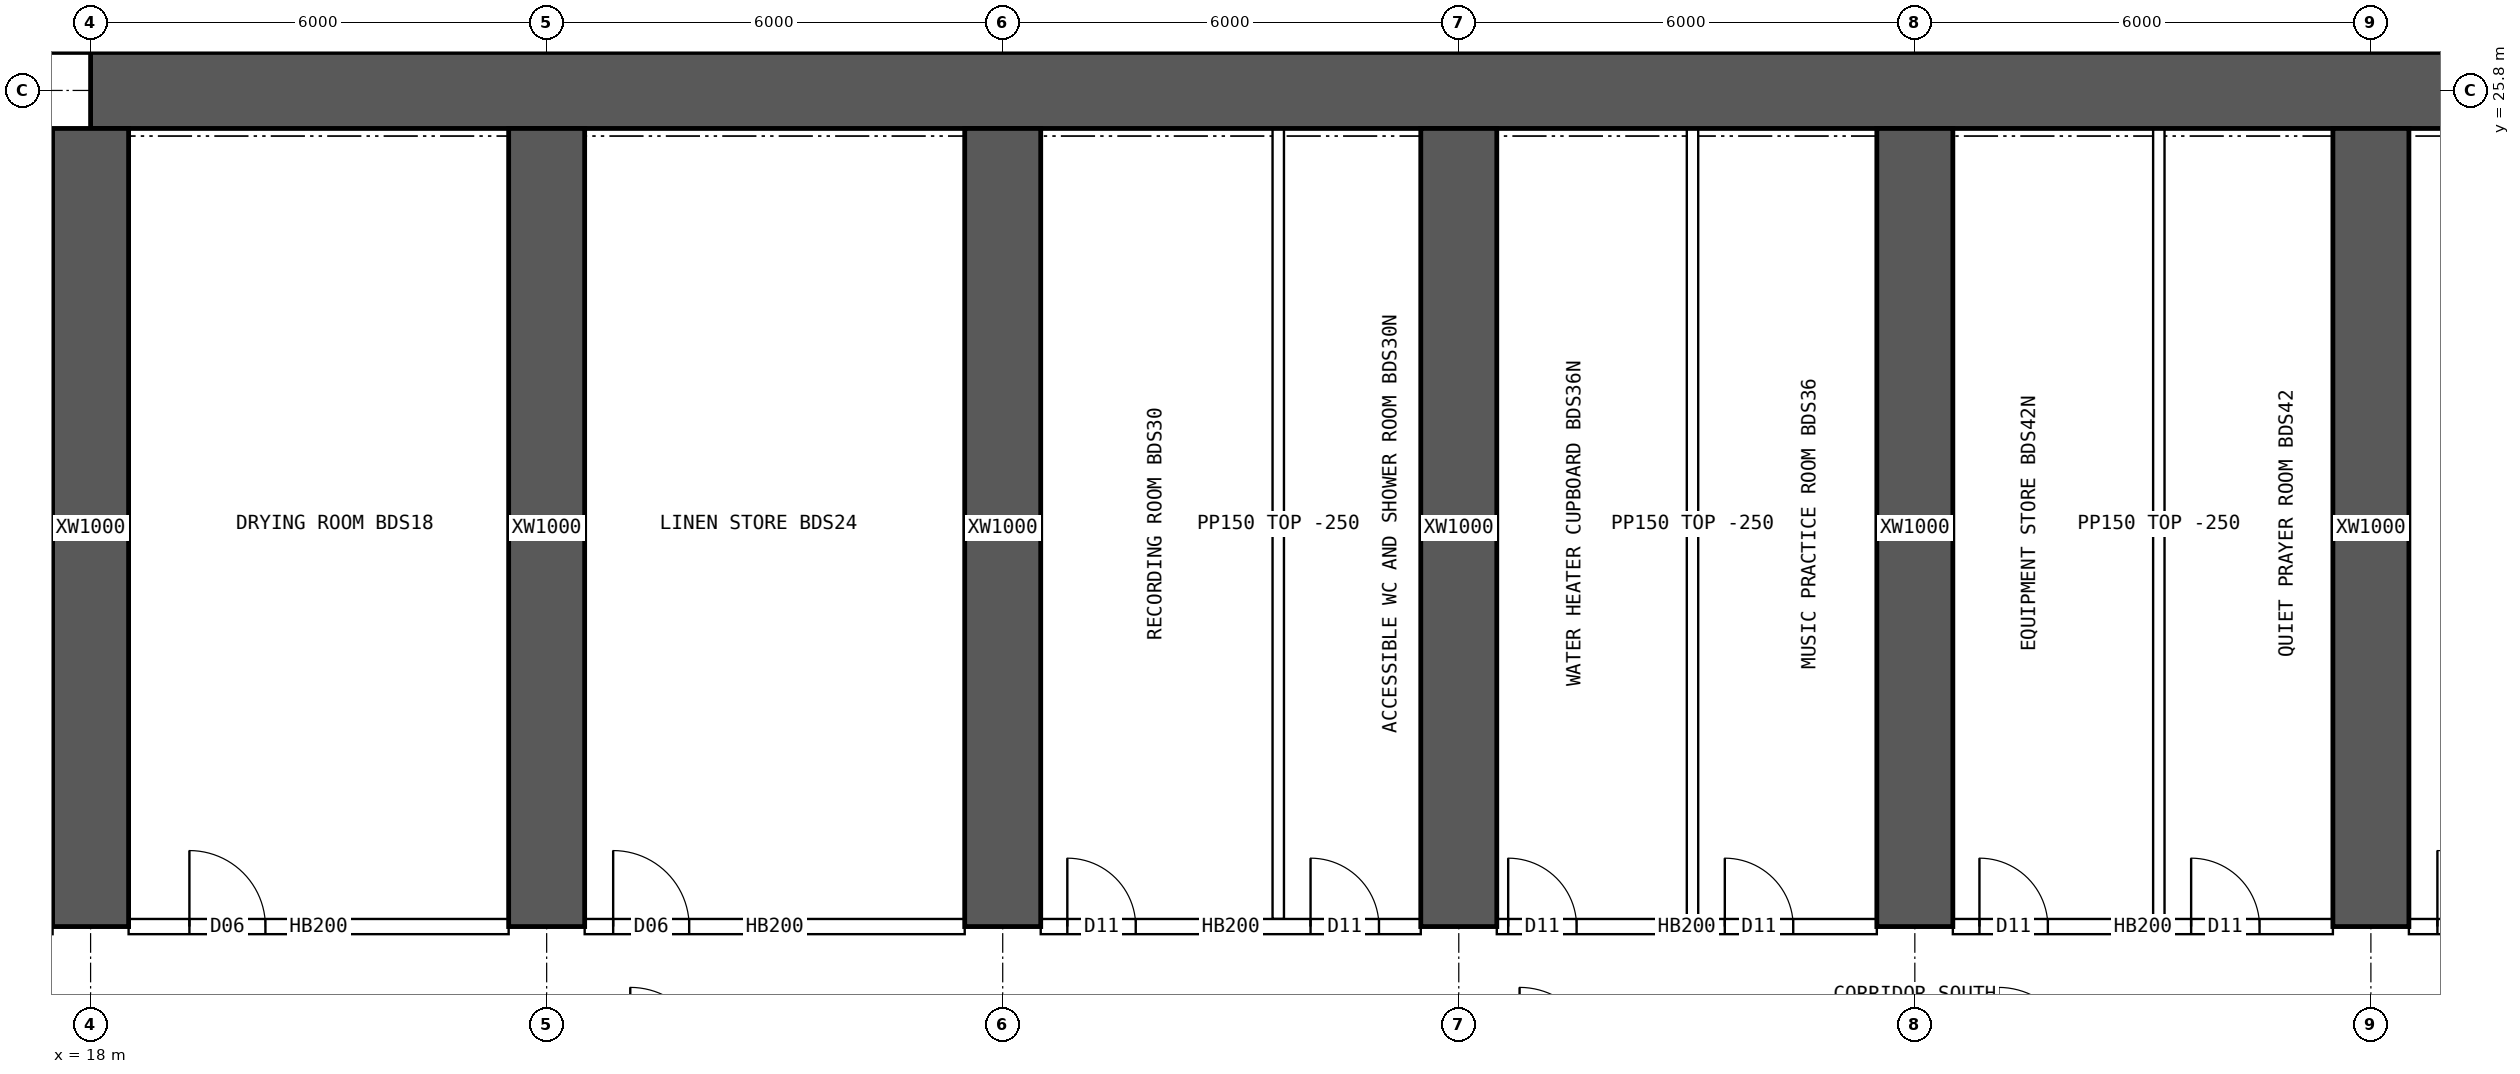
"""IFC4 building model, lengths in metres.
Left out: names, types, materials, properties, quantities, classifications, styles, units other than length and angle.
Written with IfcOpenShell. Run it as: python <this file> out.ifc"""

import sys

from ifc_helpers import new_model, si_unit, direction, frame, frame_2d, origin, place, context, subcontext, project, spatial, rectangle, extrude, element, fill, save


model = new_model("IFC4")
c1 = context("Model", 3, precision=1e-05, world=origin(), true_north=direction((0.0, 1.0)))
c2 = subcontext(c1, "Body", "Model", "MODEL_VIEW")
j1 = project(units=[si_unit("LENGTHUNIT", "METRE"), si_unit("PLANEANGLEUNIT", "RADIAN")], contexts=[c1])
p1 = place(None, origin())
s1 = spatial("IfcSite", under=j1, at=p1, CompositionType="ELEMENT")
p2 = place(p1, origin())
s2 = spatial("IfcBuilding", under=s1, at=p2, CompositionType="ELEMENT")
p3 = place(p2, frame((0.0, 0.0, 53.95)))
s3 = spatial("IfcBuildingStorey", under=s2, at=p3, CompositionType="ELEMENT", Elevation=53.95)
p4 = place(p3, frame((18.0, 25.8, 0.0), z_axis=(0.0, 0.0, 1.0), x_axis=(1.0, 0.0, 0.0)))
e1 = element("IfcWall", 1, at=p4, inside=s3, PredefinedType="SHEAR", context=c2, shape_type="SweptSolid", body=[
    extrude(rectangle(XDim=48.0, YDim=1.0, at=frame_2d((24.0, 0.0))), origin(), (0.0, 0.0, 1.0), 3.75),
])
for number, where, z_axis, x_axis in (
    (2, (18.0, 14.8, 0.0), (0.0, 0.0, 1.0), (0.0, 1.0, 0.0)),
    (3, (24.0, 14.8, 0.0), (0.0, 0.0, 1.0), (0.0, 1.0, 0.0)),
    (4, (30.0, 14.8, 0.0), (0.0, 0.0, 1.0), (0.0, 1.0, 0.0)),
    (5, (36.0, 14.8, 0.0), (0.0, 0.0, 1.0), (0.0, 1.0, 0.0)),
    (6, (42.0, 14.8, 0.0), (0.0, 0.0, 1.0), (0.0, 1.0, 0.0)),
    (7, (48.0, 14.8, 0.0), (0.0, 0.0, 1.0), (0.0, 1.0, 0.0)),
):
    element("IfcWall", number, at=place(p3, frame(where, z_axis=z_axis, x_axis=x_axis)), inside=s3, PredefinedType="SHEAR", context=c2, shape_type="SweptSolid", body=[
        extrude(rectangle(XDim=10.5, YDim=1.0, at=frame_2d((5.25, 0.0))), origin(), (0.0, 0.0, 1.0), 3.75),
    ])
p5 = place(p3, frame((18.5, 14.8, 0.0), z_axis=(0.0, 0.0, 1.0), x_axis=(1.0, 0.0, 0.0)))
e8 = element("IfcWall", 8, at=p5, inside=s3, PredefinedType="SOLIDWALL", context=c2, shape_type="SweptSolid", body=[
    extrude(rectangle(XDim=5.0, YDim=0.2, at=frame_2d((2.5, 0.0))), origin(), (0.0, 0.0, 1.0), 3.5),
])
p6 = place(p5, frame((0.8, 0.0, 0.0)))
e9 = element("IfcOpeningElement", 9, at=p6, cuts=e8, PredefinedType="OPENING", context=c2, shape_type="SweptSolid", body=[
    extrude(rectangle(XDim=1.0, YDim=2.1, at=frame_2d((0.5, 1.05))), frame((0.0, 0.11, 0.0), z_axis=(0.0, -1.0, 0.0), x_axis=(1.0, 0.0, 0.0)), (0.0, 0.0, 1.0), 0.22),
])
p7 = place(p3, frame((24.5, 14.8, 0.0), z_axis=(0.0, 0.0, 1.0), x_axis=(1.0, 0.0, 0.0)))
e10 = element("IfcWall", 10, at=p7, inside=s3, PredefinedType="SOLIDWALL", context=c2, shape_type="SweptSolid", body=[
    extrude(rectangle(XDim=5.0, YDim=0.2, at=frame_2d((2.5, 0.0))), origin(), (0.0, 0.0, 1.0), 3.5),
])
p8 = place(p7, frame((0.375, 0.0, 0.0)))
e11 = element("IfcOpeningElement", 11, at=p8, cuts=e10, PredefinedType="OPENING", context=c2, shape_type="SweptSolid", body=[
    extrude(rectangle(XDim=1.0, YDim=2.1, at=frame_2d((0.5, 1.05))), frame((0.0, 0.11, 0.0), z_axis=(0.0, -1.0, 0.0), x_axis=(1.0, 0.0, 0.0)), (0.0, 0.0, 1.0), 0.22),
])
p9 = place(p3, frame((30.5, 14.8, 0.0), z_axis=(0.0, 0.0, 1.0), x_axis=(1.0, 0.0, 0.0)))
e12 = element("IfcWall", 12, at=p9, inside=s3, PredefinedType="SOLIDWALL", context=c2, shape_type="SweptSolid", body=[
    extrude(rectangle(XDim=5.0, YDim=0.2, at=frame_2d((2.5, 0.0))), origin(), (0.0, 0.0, 1.0), 3.5),
])
p10 = place(p9, frame((0.35, 0.0, 0.0)))
e13 = element("IfcOpeningElement", 13, at=p10, cuts=e12, PredefinedType="OPENING", context=c2, shape_type="SweptSolid", body=[
    extrude(rectangle(XDim=0.9, YDim=2.1, at=frame_2d((0.45, 1.05))), frame((0.0, 0.11, 0.0), z_axis=(0.0, -1.0, 0.0), x_axis=(1.0, 0.0, 0.0)), (0.0, 0.0, 1.0), 0.22),
])
p11 = place(p9, frame((3.55, 0.0, 0.0)))
e14 = element("IfcOpeningElement", 14, at=p11, cuts=e12, PredefinedType="OPENING", context=c2, shape_type="SweptSolid", body=[
    extrude(rectangle(XDim=0.9, YDim=2.1, at=frame_2d((0.45, 1.05))), frame((0.0, 0.11, 0.0), z_axis=(0.0, -1.0, 0.0), x_axis=(1.0, 0.0, 0.0)), (0.0, 0.0, 1.0), 0.22),
])
p12 = place(p3, frame((36.5, 14.8, 0.0), z_axis=(0.0, 0.0, 1.0), x_axis=(1.0, 0.0, 0.0)))
e15 = element("IfcWall", 15, at=p12, inside=s3, PredefinedType="SOLIDWALL", context=c2, shape_type="SweptSolid", body=[
    extrude(rectangle(XDim=5.0, YDim=0.2, at=frame_2d((2.5, 0.0))), origin(), (0.0, 0.0, 1.0), 3.5),
])
p13 = place(p12, frame((0.15, 0.0, 0.0)))
e16 = element("IfcOpeningElement", 16, at=p13, cuts=e15, PredefinedType="OPENING", context=c2, shape_type="SweptSolid", body=[
    extrude(rectangle(XDim=0.9, YDim=2.1, at=frame_2d((0.45, 1.05))), frame((0.0, 0.11, 0.0), z_axis=(0.0, -1.0, 0.0), x_axis=(1.0, 0.0, 0.0)), (0.0, 0.0, 1.0), 0.22),
])
p14 = place(p12, frame((3.0, 0.0, 0.0)))
e17 = element("IfcOpeningElement", 17, at=p14, cuts=e15, PredefinedType="OPENING", context=c2, shape_type="SweptSolid", body=[
    extrude(rectangle(XDim=0.9, YDim=2.1, at=frame_2d((0.45, 1.05))), frame((0.0, 0.11, 0.0), z_axis=(0.0, -1.0, 0.0), x_axis=(1.0, 0.0, 0.0)), (0.0, 0.0, 1.0), 0.22),
])
p15 = place(p3, frame((42.5, 14.8, 0.0), z_axis=(0.0, 0.0, 1.0), x_axis=(1.0, 0.0, 0.0)))
e18 = element("IfcWall", 18, at=p15, inside=s3, PredefinedType="SOLIDWALL", context=c2, shape_type="SweptSolid", body=[
    extrude(rectangle(XDim=5.0, YDim=0.2, at=frame_2d((2.5, 0.0))), origin(), (0.0, 0.0, 1.0), 3.5),
])
p16 = place(p15, frame((0.35, 0.0, 0.0)))
e19 = element("IfcOpeningElement", 19, at=p16, cuts=e18, PredefinedType="OPENING", context=c2, shape_type="SweptSolid", body=[
    extrude(rectangle(XDim=0.9, YDim=2.1, at=frame_2d((0.45, 1.05))), frame((0.0, 0.11, 0.0), z_axis=(0.0, -1.0, 0.0), x_axis=(1.0, 0.0, 0.0)), (0.0, 0.0, 1.0), 0.22),
])
p17 = place(p15, frame((3.135, 0.0, 0.0)))
e20 = element("IfcOpeningElement", 20, at=p17, cuts=e18, PredefinedType="OPENING", context=c2, shape_type="SweptSolid", body=[
    extrude(rectangle(XDim=0.9, YDim=2.1, at=frame_2d((0.45, 1.05))), frame((0.0, 0.11, 0.0), z_axis=(0.0, -1.0, 0.0), x_axis=(1.0, 0.0, 0.0)), (0.0, 0.0, 1.0), 0.22),
])
p18 = place(p3, frame((48.5, 14.8, 0.0), z_axis=(0.0, 0.0, 1.0), x_axis=(1.0, 0.0, 0.0)))
e21 = element("IfcWall", 21, at=p18, inside=s3, PredefinedType="SOLIDWALL", context=c2, shape_type="SweptSolid", body=[
    extrude(rectangle(XDim=5.0, YDim=0.2, at=frame_2d((2.5, 0.0))), origin(), (0.0, 0.0, 1.0), 3.5),
])
p19 = place(p18, frame((0.375, 0.0, 0.0)))
e22 = element("IfcOpeningElement", 22, at=p19, cuts=e21, PredefinedType="OPENING", context=c2, shape_type="SweptSolid", body=[
    extrude(rectangle(XDim=1.0, YDim=2.1, at=frame_2d((0.5, 1.05))), frame((0.0, 0.11, 0.0), z_axis=(0.0, -1.0, 0.0), x_axis=(1.0, 0.0, 0.0)), (0.0, 0.0, 1.0), 0.22),
])
for number, where, z_axis, x_axis in (
    (23, (33.625, 14.9, 0.0), (0.0, 0.0, 1.0), (0.0, 1.0, 0.0)),
    (24, (39.075, 14.9, 0.0), (0.0, 0.0, 1.0), (0.0, 1.0, 0.0)),
    (25, (45.21, 14.9, 0.0), (0.0, 0.0, 1.0), (0.0, 1.0, 0.0)),
):
    element("IfcWall", number, at=place(p3, frame(where, z_axis=z_axis, x_axis=x_axis)), inside=s3, PredefinedType="PARTITIONING", context=c2, shape_type="SweptSolid", body=[
        extrude(rectangle(XDim=10.4, YDim=0.15, at=frame_2d((5.2, 0.0))), origin(), (0.0, 0.0, 1.0), 3.5),
    ])
p20 = place(p6, origin())
e26 = element("IfcDoor", 26, at=p20, inside=s3, OperationType="SINGLE_SWING_LEFT", PredefinedType="DOOR", context=c2, shape_type="SweptSolid", body=[
    extrude(rectangle(XDim=1.0, YDim=2.1, at=frame_2d((0.5, 1.05))), frame((0.0, 0.025, 0.0), z_axis=(0.0, -1.0, 0.0), x_axis=(1.0, 0.0, 0.0)), (0.0, 0.0, 1.0), 0.05),
])
fill(e9, e26)
p21 = place(p8, origin())
e27 = element("IfcDoor", 27, at=p21, inside=s3, OperationType="SINGLE_SWING_LEFT", PredefinedType="DOOR", context=c2, shape_type="SweptSolid", body=[
    extrude(rectangle(XDim=1.0, YDim=2.1, at=frame_2d((0.5, 1.05))), frame((0.0, 0.025, 0.0), z_axis=(0.0, -1.0, 0.0), x_axis=(1.0, 0.0, 0.0)), (0.0, 0.0, 1.0), 0.05),
])
fill(e11, e27)
p22 = place(p10, origin())
e28 = element("IfcDoor", 28, at=p22, inside=s3, OperationType="SINGLE_SWING_LEFT", PredefinedType="DOOR", context=c2, shape_type="SweptSolid", body=[
    extrude(rectangle(XDim=0.9, YDim=2.1, at=frame_2d((0.45, 1.05))), frame((0.0, 0.025, 0.0), z_axis=(0.0, -1.0, 0.0), x_axis=(1.0, 0.0, 0.0)), (0.0, 0.0, 1.0), 0.05),
])
fill(e13, e28)
p23 = place(p11, origin())
e29 = element("IfcDoor", 29, at=p23, inside=s3, OperationType="SINGLE_SWING_LEFT", PredefinedType="DOOR", context=c2, shape_type="SweptSolid", body=[
    extrude(rectangle(XDim=0.9, YDim=2.1, at=frame_2d((0.45, 1.05))), frame((0.0, 0.025, 0.0), z_axis=(0.0, -1.0, 0.0), x_axis=(1.0, 0.0, 0.0)), (0.0, 0.0, 1.0), 0.05),
])
fill(e14, e29)
p24 = place(p13, origin())
e30 = element("IfcDoor", 30, at=p24, inside=s3, OperationType="SINGLE_SWING_LEFT", PredefinedType="DOOR", context=c2, shape_type="SweptSolid", body=[
    extrude(rectangle(XDim=0.9, YDim=2.1, at=frame_2d((0.45, 1.05))), frame((0.0, 0.025, 0.0), z_axis=(0.0, -1.0, 0.0), x_axis=(1.0, 0.0, 0.0)), (0.0, 0.0, 1.0), 0.05),
])
fill(e16, e30)
p25 = place(p14, origin())
e31 = element("IfcDoor", 31, at=p25, inside=s3, OperationType="SINGLE_SWING_LEFT", PredefinedType="DOOR", context=c2, shape_type="SweptSolid", body=[
    extrude(rectangle(XDim=0.9, YDim=2.1, at=frame_2d((0.45, 1.05))), frame((0.0, 0.025, 0.0), z_axis=(0.0, -1.0, 0.0), x_axis=(1.0, 0.0, 0.0)), (0.0, 0.0, 1.0), 0.05),
])
fill(e17, e31)
p26 = place(p16, origin())
e32 = element("IfcDoor", 32, at=p26, inside=s3, OperationType="SINGLE_SWING_LEFT", PredefinedType="DOOR", context=c2, shape_type="SweptSolid", body=[
    extrude(rectangle(XDim=0.9, YDim=2.1, at=frame_2d((0.45, 1.05))), frame((0.0, 0.025, 0.0), z_axis=(0.0, -1.0, 0.0), x_axis=(1.0, 0.0, 0.0)), (0.0, 0.0, 1.0), 0.05),
])
fill(e19, e32)
p27 = place(p17, origin())
e33 = element("IfcDoor", 33, at=p27, inside=s3, OperationType="SINGLE_SWING_LEFT", PredefinedType="DOOR", context=c2, shape_type="SweptSolid", body=[
    extrude(rectangle(XDim=0.9, YDim=2.1, at=frame_2d((0.45, 1.05))), frame((0.0, 0.025, 0.0), z_axis=(0.0, -1.0, 0.0), x_axis=(1.0, 0.0, 0.0)), (0.0, 0.0, 1.0), 0.05),
])
fill(e20, e33)
p28 = place(p19, origin())
e34 = element("IfcDoor", 34, at=p28, inside=s3, OperationType="SINGLE_SWING_LEFT", PredefinedType="DOOR", context=c2, shape_type="SweptSolid", body=[
    extrude(rectangle(XDim=1.0, YDim=2.1, at=frame_2d((0.5, 1.05))), frame((0.0, 0.025, 0.0), z_axis=(0.0, -1.0, 0.0), x_axis=(1.0, 0.0, 0.0)), (0.0, 0.0, 1.0), 0.05),
])
fill(e22, e34)
save(model, sys.argv[1])
